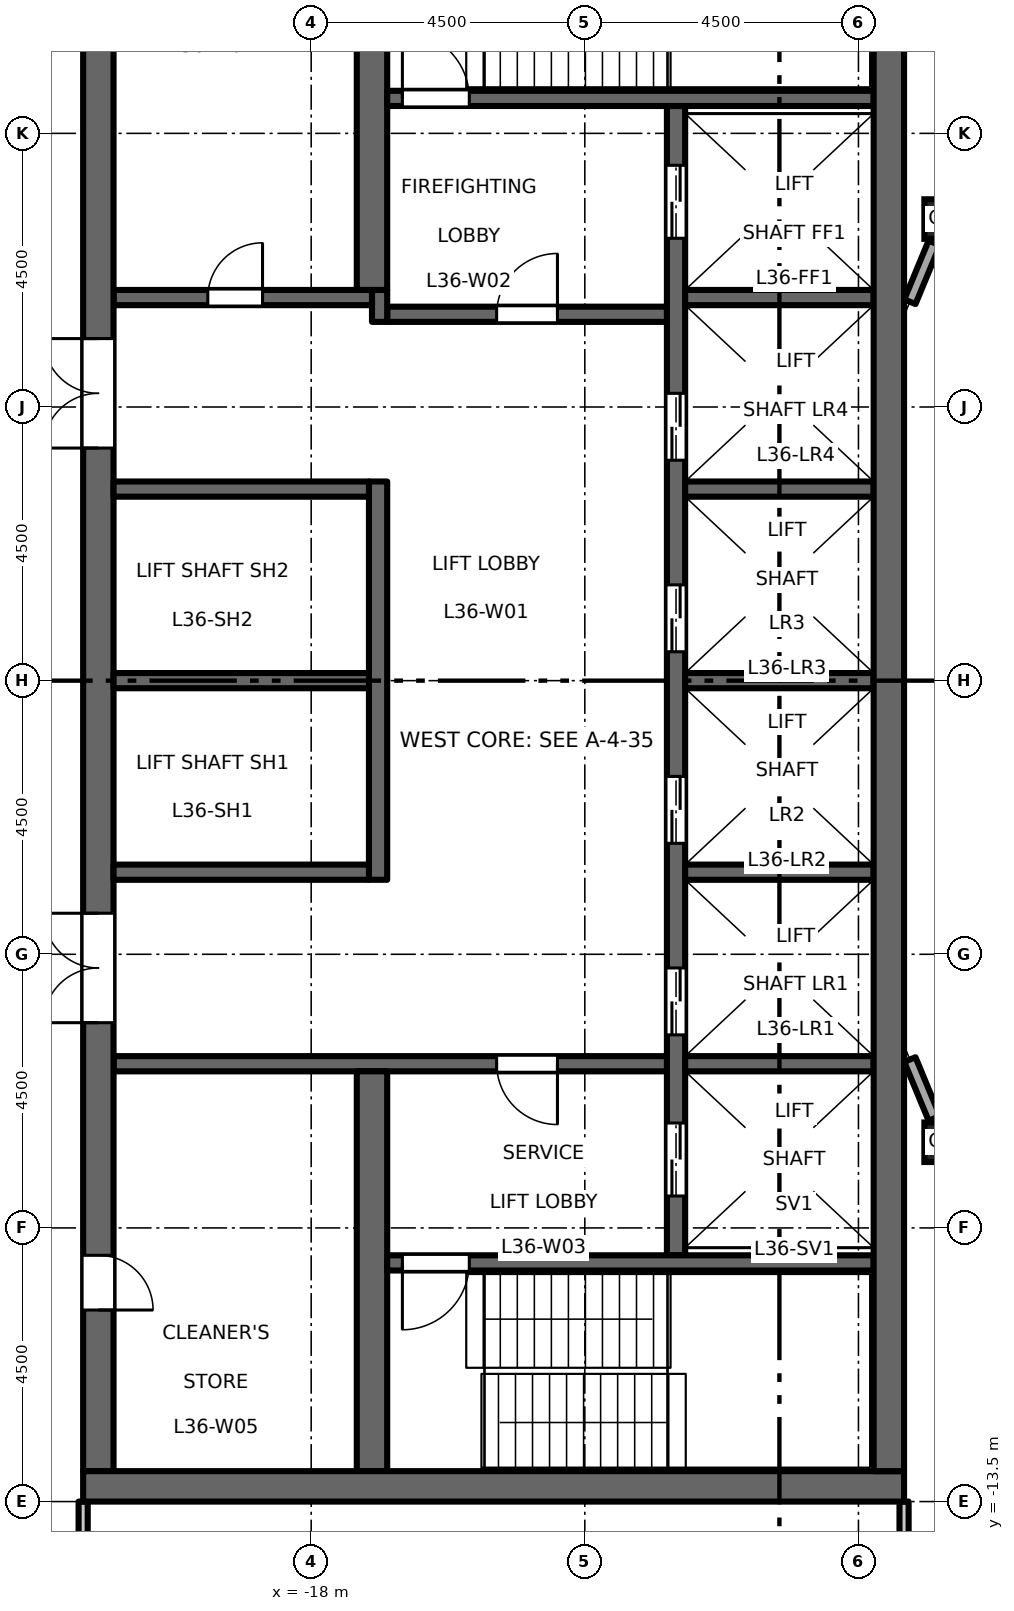
"""IFC4 building model, lengths in metres.
Left out: names, types, materials, properties, quantities, classifications, styles, units other than length and angle.
Written with IfcOpenShell. Run it as: python <this file> out.ifc"""

import sys

from ifc_helpers import new_model, si_unit, direction, frame, frame_2d, origin, origin_2d, place, context, subcontext, project, spatial, rectangle, hollow_rectangle, extrude, element, fill, save


model = new_model("IFC4")
c1 = context("Model", 3, precision=1e-05, world=origin(), true_north=direction((0.0, 1.0)))
c2 = subcontext(c1, "Body", "Model", "MODEL_VIEW")
j1 = project(units=[si_unit("LENGTHUNIT", "METRE"), si_unit("PLANEANGLEUNIT", "RADIAN")], contexts=[c1])
p1 = place(None, origin())
s1 = spatial("IfcSite", under=j1, at=p1, CompositionType="ELEMENT")
p2 = place(p1, origin())
s2 = spatial("IfcBuilding", under=s1, at=p2, CompositionType="ELEMENT")
p3 = place(p2, frame((0.0, 0.0, 167.7)))
s3 = spatial("IfcBuildingStorey", under=s2, at=p3, CompositionType="ELEMENT", Elevation=167.7)
for number, where, z_axis, x_axis in (
    (1, (-7.591, -7.591, 0.0), (0.0, 0.0, 1.0), (1.0, 0.0, 0.0)),
    (2, (-7.591, 7.591, 0.0), (0.0, 0.0, 1.0), (1.0, 0.0, 0.0)),
):
    element("IfcColumn", number, at=place(p3, frame(where, z_axis=z_axis, x_axis=x_axis)), inside=s3, PredefinedType="COLUMN", context=c2, shape_type="SweptSolid", body=[
        extrude(hollow_rectangle(XDim=0.65, YDim=0.65, WallThickness=0.036, at=origin_2d()), origin(), (0.0, 0.0, 1.0), 4.5),
    ])
p4 = place(p3, frame((-12.0, -9.45, 0.0), z_axis=(0.0, 0.0, 1.0), x_axis=(0.0, 1.0, 0.0)))
e3 = element("IfcWall", 3, at=p4, inside=s3, PredefinedType="SHEAR", context=c2, shape_type="SweptSolid", body=[
    extrude(rectangle(XDim=18.9, YDim=0.3, at=frame_2d((9.45, 0.0))), origin(), (0.0, 0.0, 1.0), 4.35),
])
p5 = place(p4, frame((3.625, 0.0, 0.0)))
e4 = element("IfcOpeningElement", 4, at=p5, cuts=e3, PredefinedType="OPENING", context=c2, shape_type="SweptSolid", body=[
    extrude(rectangle(XDim=1.1, YDim=2.1, at=frame_2d((0.55, 1.05))), frame((0.0, 0.16, 0.0), z_axis=(0.0, -1.0, 0.0), x_axis=(1.0, 0.0, 0.0)), (0.0, 0.0, 1.0), 0.32),
])
p6 = place(p4, frame((6.775, 0.0, 0.0)))
e5 = element("IfcOpeningElement", 5, at=p6, cuts=e3, PredefinedType="OPENING", context=c2, shape_type="SweptSolid", body=[
    extrude(rectangle(XDim=1.1, YDim=2.1, at=frame_2d((0.55, 1.05))), frame((0.0, 0.16, 0.0), z_axis=(0.0, -1.0, 0.0), x_axis=(1.0, 0.0, 0.0)), (0.0, 0.0, 1.0), 0.32),
])
p7 = place(p4, frame((9.925, 0.0, 0.0)))
e6 = element("IfcOpeningElement", 6, at=p7, cuts=e3, PredefinedType="OPENING", context=c2, shape_type="SweptSolid", body=[
    extrude(rectangle(XDim=1.1, YDim=2.1, at=frame_2d((0.55, 1.05))), frame((0.0, 0.16, 0.0), z_axis=(0.0, -1.0, 0.0), x_axis=(1.0, 0.0, 0.0)), (0.0, 0.0, 1.0), 0.32),
])
p8 = place(p4, frame((13.075, 0.0, 0.0)))
e7 = element("IfcOpeningElement", 7, at=p8, cuts=e3, PredefinedType="OPENING", context=c2, shape_type="SweptSolid", body=[
    extrude(rectangle(XDim=1.1, YDim=2.1, at=frame_2d((0.55, 1.05))), frame((0.0, 0.16, 0.0), z_axis=(0.0, -1.0, 0.0), x_axis=(1.0, 0.0, 0.0)), (0.0, 0.0, 1.0), 0.32),
])
p9 = place(p4, frame((16.725, 0.0, 0.0)))
e8 = element("IfcOpeningElement", 8, at=p9, cuts=e3, PredefinedType="OPENING", context=c2, shape_type="SweptSolid", body=[
    extrude(rectangle(XDim=1.2, YDim=2.1, at=frame_2d((0.6, 1.05))), frame((0.0, 0.16, 0.0), z_axis=(0.0, -1.0, 0.0), x_axis=(1.0, 0.0, 0.0)), (0.0, 0.0, 1.0), 0.32),
])
p10 = place(p4, frame((0.975, 0.0, 0.0)))
e9 = element("IfcOpeningElement", 9, at=p10, cuts=e3, PredefinedType="OPENING", context=c2, shape_type="SweptSolid", body=[
    extrude(rectangle(XDim=1.2, YDim=2.1, at=frame_2d((0.6, 1.05))), frame((0.0, 0.16, 0.0), z_axis=(0.0, -1.0, 0.0), x_axis=(1.0, 0.0, 0.0)), (0.0, 0.0, 1.0), 0.32),
])
p11 = place(p3, frame((-12.15, 6.025, 0.0), z_axis=(0.0, 0.0, 1.0), x_axis=(-1.0, 0.0, 0.0)))
e10 = element("IfcWall", 10, at=p11, inside=s3, PredefinedType="SHEAR", context=c2, shape_type="SweptSolid", body=[
    extrude(rectangle(XDim=4.6, YDim=0.25, at=frame_2d((2.3, 0.0))), origin(), (0.0, 0.0, 1.0), 4.35),
])
p12 = place(p11, frame((1.8, 0.0, 0.0)))
e11 = element("IfcOpeningElement", 11, at=p12, cuts=e10, PredefinedType="OPENING", context=c2, shape_type="SweptSolid", body=[
    extrude(rectangle(XDim=1.0, YDim=2.1, at=frame_2d((0.5, 1.05))), frame((0.0, 0.135, 0.0), z_axis=(0.0, -1.0, 0.0), x_axis=(1.0, 0.0, 0.0)), (0.0, 0.0, 1.0), 0.27),
])
p13 = place(p3, frame((-16.875, 5.9, 0.0), z_axis=(0.0, 0.0, 1.0), x_axis=(0.0, 1.0, 0.0)))
e12 = element("IfcWall", 12, at=p13, inside=s3, PredefinedType="SHEAR", context=c2, shape_type="SweptSolid", body=[
    extrude(rectangle(XDim=0.525, YDim=0.25, at=frame_2d((0.263, 0.0))), origin(), (0.0, 0.0, 1.0), 4.35),
])
p14 = place(p3, frame((-17.0, 6.3, 0.0), z_axis=(0.0, 0.0, 1.0), x_axis=(-1.0, 0.0, 0.0)))
e13 = element("IfcWall", 13, at=p14, inside=s3, PredefinedType="SHEAR", context=c2, shape_type="SweptSolid", body=[
    extrude(rectangle(XDim=4.25, YDim=0.25, at=frame_2d((2.125, 0.0))), origin(), (0.0, 0.0, 1.0), 4.35),
])
p15 = place(p14, frame((1.8, 0.0, 0.0)))
e14 = element("IfcOpeningElement", 14, at=p15, cuts=e13, PredefinedType="OPENING", context=c2, shape_type="SweptSolid", body=[
    extrude(rectangle(XDim=0.9, YDim=2.1, at=frame_2d((0.45, 1.05))), frame((0.0, 0.135, 0.0), z_axis=(0.0, -1.0, 0.0), x_axis=(1.0, 0.0, 0.0)), (0.0, 0.0, 1.0), 0.27),
])
p16 = place(p3, frame((-12.15, -6.3, 0.0), z_axis=(0.0, 0.0, 1.0), x_axis=(-1.0, 0.0, 0.0)))
e15 = element("IfcWall", 15, at=p16, inside=s3, PredefinedType="SHEAR", context=c2, shape_type="SweptSolid", body=[
    extrude(rectangle(XDim=9.1, YDim=0.25, at=frame_2d((4.55, 0.0))), origin(), (0.0, 0.0, 1.0), 4.35),
])
p17 = place(p16, frame((1.8, 0.0, 0.0)))
e16 = element("IfcOpeningElement", 16, at=p17, cuts=e15, PredefinedType="OPENING", context=c2, shape_type="SweptSolid", body=[
    extrude(rectangle(XDim=1.0, YDim=2.1, at=frame_2d((0.5, 1.05))), frame((0.0, 0.135, 0.0), z_axis=(0.0, -1.0, 0.0), x_axis=(1.0, 0.0, 0.0)), (0.0, 0.0, 1.0), 0.27),
])
p18 = place(p3, frame((-21.5, -13.0, 0.0), z_axis=(0.0, 0.0, 1.0), x_axis=(0.0, 1.0, 0.0)))
e17 = element("IfcWall", 17, at=p18, inside=s3, PredefinedType="SHEAR", context=c2, shape_type="SweptSolid", body=[
    extrude(rectangle(XDim=26.0, YDim=0.5, at=frame_2d((13.0, 0.0))), origin(), (0.0, 0.0, 1.0), 4.35),
])
p19 = place(p18, frame((16.825, 0.0, 0.0)))
e18 = element("IfcOpeningElement", 18, at=p19, cuts=e17, PredefinedType="OPENING", context=c2, shape_type="SweptSolid", body=[
    extrude(rectangle(XDim=1.8, YDim=2.1, at=frame_2d((0.9, 1.05))), frame((0.0, 0.26, 0.0), z_axis=(0.0, -1.0, 0.0), x_axis=(1.0, 0.0, 0.0)), (0.0, 0.0, 1.0), 0.52),
])
p20 = place(p18, frame((7.375, 0.0, 0.0)))
e19 = element("IfcOpeningElement", 19, at=p20, cuts=e17, PredefinedType="OPENING", context=c2, shape_type="SweptSolid", body=[
    extrude(rectangle(XDim=1.8, YDim=2.1, at=frame_2d((0.9, 1.05))), frame((0.0, 0.26, 0.0), z_axis=(0.0, -1.0, 0.0), x_axis=(1.0, 0.0, 0.0)), (0.0, 0.0, 1.0), 0.52),
])
p21 = place(p18, frame((2.65, 0.0, 0.0)))
e20 = element("IfcOpeningElement", 20, at=p21, cuts=e17, PredefinedType="OPENING", context=c2, shape_type="SweptSolid", body=[
    extrude(rectangle(XDim=0.9, YDim=2.1, at=frame_2d((0.45, 1.05))), frame((0.0, 0.26, 0.0), z_axis=(0.0, -1.0, 0.0), x_axis=(1.0, 0.0, 0.0)), (0.0, 0.0, 1.0), 0.52),
])
p22 = place(p3, frame((-16.9, -3.275, 0.0), z_axis=(0.0, 0.0, 1.0), x_axis=(0.0, 1.0, 0.0)))
e21 = element("IfcWall", 21, at=p22, inside=s3, PredefinedType="SHEAR", context=c2, shape_type="SweptSolid", body=[
    extrude(rectangle(XDim=6.55, YDim=0.3, at=frame_2d((3.275, 0.0))), origin(), (0.0, 0.0, 1.0), 4.35),
])
for number, where, z_axis, x_axis in (
    (22, (-17.05, 0.0, 0.0), (0.0, 0.0, 1.0), (-1.0, 0.0, 0.0)),
    (23, (-17.05, 3.15, 0.0), (0.0, 0.0, 1.0), (-1.0, 0.0, 0.0)),
    (24, (-17.05, -3.15, 0.0), (0.0, 0.0, 1.0), (-1.0, 0.0, 0.0)),
):
    element("IfcWall", number, at=place(p3, frame(where, z_axis=z_axis, x_axis=x_axis)), inside=s3, PredefinedType="SHEAR", context=c2, shape_type="SweptSolid", body=[
        extrude(rectangle(XDim=4.2, YDim=0.25, at=frame_2d((2.1, 0.0))), origin(), (0.0, 0.0, 1.0), 4.35),
    ])
for number, where, z_axis, x_axis in (
    (25, (-17.0, 6.425, 0.0), (0.0, 0.0, 1.0), (0.0, 1.0, 0.0)),
    (26, (-17.0, -13.0, 0.0), (0.0, 0.0, 1.0), (0.0, 1.0, 0.0)),
):
    element("IfcWall", number, at=place(p3, frame(where, z_axis=z_axis, x_axis=x_axis)), inside=s3, PredefinedType="SHEAR", context=c2, shape_type="SweptSolid", body=[
        extrude(rectangle(XDim=6.575, YDim=0.5, at=frame_2d((3.288, 0.0))), origin(), (0.0, 0.0, 1.0), 4.35),
    ])
for number, where, z_axis, x_axis in (
    (27, (-8.75, 0.0, 0.0), (0.0, 0.0, 1.0), (-1.0, 0.0, 0.0)),
    (28, (-8.75, 3.15, 0.0), (0.0, 0.0, 1.0), (-1.0, 0.0, 0.0)),
    (29, (-8.75, 6.3, 0.0), (0.0, 0.0, 1.0), (-1.0, 0.0, 0.0)),
    (30, (-8.75, -3.15, 0.0), (0.0, 0.0, 1.0), (-1.0, 0.0, 0.0)),
    (31, (-8.75, -6.3, 0.0), (0.0, 0.0, 1.0), (-1.0, 0.0, 0.0)),
):
    element("IfcWall", number, at=place(p3, frame(where, z_axis=z_axis, x_axis=x_axis)), inside=s3, PredefinedType="SHEAR", context=c2, shape_type="SweptSolid", body=[
        extrude(rectangle(XDim=3.1, YDim=0.25, at=frame_2d((1.55, 0.0))), origin(), (0.0, 0.0, 1.0), 4.35),
    ])
p23 = place(p3, frame((-8.75, 9.575, 0.0), z_axis=(0.0, 0.0, 1.0), x_axis=(-1.0, 0.0, 0.0)))
e32 = element("IfcWall", 32, at=p23, inside=s3, PredefinedType="SHEAR", context=c2, shape_type="SweptSolid", body=[
    extrude(rectangle(XDim=8.0, YDim=0.25, at=frame_2d((4.0, 0.0))), origin(), (0.0, 0.0, 1.0), 4.35),
])
p24 = place(p23, frame((6.65, 0.0, 0.0)))
e33 = element("IfcOpeningElement", 33, at=p24, cuts=e32, PredefinedType="OPENING", context=c2, shape_type="SweptSolid", body=[
    extrude(rectangle(XDim=1.1, YDim=2.1, at=frame_2d((0.55, 1.05))), frame((0.0, 0.135, 0.0), z_axis=(0.0, -1.0, 0.0), x_axis=(1.0, 0.0, 0.0)), (0.0, 0.0, 1.0), 0.27),
])
p25 = place(p3, frame((-8.75, -9.575, 0.0), z_axis=(0.0, 0.0, 1.0), x_axis=(-1.0, 0.0, 0.0)))
e34 = element("IfcWall", 34, at=p25, inside=s3, PredefinedType="SHEAR", context=c2, shape_type="SweptSolid", body=[
    extrude(rectangle(XDim=8.0, YDim=0.25, at=frame_2d((4.0, 0.0))), origin(), (0.0, 0.0, 1.0), 4.35),
])
p26 = place(p25, frame((6.65, 0.0, 0.0)))
e35 = element("IfcOpeningElement", 35, at=p26, cuts=e34, PredefinedType="OPENING", context=c2, shape_type="SweptSolid", body=[
    extrude(rectangle(XDim=1.1, YDim=2.1, at=frame_2d((0.55, 1.05))), frame((0.0, 0.135, 0.0), z_axis=(0.0, -1.0, 0.0), x_axis=(1.0, 0.0, 0.0)), (0.0, 0.0, 1.0), 0.27),
])
p27 = place(p3, frame((-8.25, -13.25, 0.0), z_axis=(0.0, 0.0, 1.0), x_axis=(-1.0, 0.0, 0.0)))
e36 = element("IfcWall", 36, at=p27, inside=s3, PredefinedType="SHEAR", context=c2, shape_type="SweptSolid", body=[
    extrude(rectangle(XDim=13.5, YDim=0.5, at=frame_2d((6.75, 0.0))), origin(), (0.0, 0.0, 1.0), 4.35),
])
p28 = place(p3, frame((-8.5, -13.0, 0.0), z_axis=(0.0, 0.0, 1.0), x_axis=(0.0, 1.0, 0.0)))
e37 = element("IfcWall", 37, at=p28, inside=s3, PredefinedType="SHEAR", context=c2, shape_type="SweptSolid", body=[
    extrude(rectangle(XDim=26.0, YDim=0.5, at=frame_2d((13.0, 0.0))), origin(), (0.0, 0.0, 1.0), 4.35),
])
for number, where, z_axis, x_axis in (
    (38, (-7.753, 7.199, 0.0), (0.0, 0.0, 1.0), (-0.383, -0.924, 0.0)),
    (39, (-8.154, -6.231, 0.0), (0.0, 0.0, 1.0), (0.383, -0.924, 0.0)),
):
    element("IfcWall", number, at=place(p3, frame(where, z_axis=z_axis, x_axis=x_axis)), inside=s3, PredefinedType="STANDARD", context=c2, shape_type="SweptSolid", body=[
        extrude(rectangle(XDim=1.048, YDim=0.2, at=frame_2d((0.524, 0.0))), origin(), (0.0, 0.0, 1.0), 3.826),
    ])
for number, where, z_axis, x_axis in (
    (40, (-21.75, -17.925, 0.0), (0.0, 0.0, 1.0), (0.0, 1.0, 0.0)),
    (41, (-8.25, -17.925, 0.0), (0.0, 0.0, 1.0), (0.0, 1.0, 0.0)),
):
    element("IfcWall", number, at=place(p3, frame(where, z_axis=z_axis, x_axis=x_axis)), inside=s3, PredefinedType="PARTITIONING", context=c2, shape_type="SweptSolid", body=[
        extrude(rectangle(XDim=4.425, YDim=0.15, at=frame_2d((2.212, 0.0))), origin(), (0.0, 0.0, 1.0), 4.35),
    ])
p29 = place(p12, origin())
e42 = element("IfcDoor", 42, at=p29, inside=s3, OperationType="SINGLE_SWING_LEFT", PredefinedType="DOOR", context=c2, shape_type="SweptSolid", body=[
    extrude(rectangle(XDim=1.0, YDim=2.1, at=frame_2d((0.5, 1.05))), frame((0.0, 0.025, 0.0), z_axis=(0.0, -1.0, 0.0), x_axis=(1.0, 0.0, 0.0)), (0.0, 0.0, 1.0), 0.05),
])
fill(e11, e42)
p30 = place(p17, origin())
e43 = element("IfcDoor", 43, at=p30, inside=s3, OperationType="SINGLE_SWING_RIGHT", PredefinedType="DOOR", context=c2, shape_type="SweptSolid", body=[
    extrude(rectangle(XDim=1.0, YDim=2.1, at=frame_2d((0.5, 1.05))), frame((0.0, 0.025, 0.0), z_axis=(0.0, -1.0, 0.0), x_axis=(1.0, 0.0, 0.0)), (0.0, 0.0, 1.0), 0.05),
])
fill(e16, e43)
p31 = place(p24, origin())
e44 = element("IfcDoor", 44, at=p31, inside=s3, OperationType="SINGLE_SWING_RIGHT", PredefinedType="DOOR", context=c2, shape_type="SweptSolid", body=[
    extrude(rectangle(XDim=1.1, YDim=2.1, at=frame_2d((0.55, 1.05))), frame((0.0, 0.025, 0.0), z_axis=(0.0, -1.0, 0.0), x_axis=(1.0, 0.0, 0.0)), (0.0, 0.0, 1.0), 0.05),
])
fill(e33, e44)
p32 = place(p26, origin())
e45 = element("IfcDoor", 45, at=p32, inside=s3, OperationType="SINGLE_SWING_LEFT", PredefinedType="DOOR", context=c2, shape_type="SweptSolid", body=[
    extrude(rectangle(XDim=1.1, YDim=2.1, at=frame_2d((0.55, 1.05))), frame((0.0, 0.025, 0.0), z_axis=(0.0, -1.0, 0.0), x_axis=(1.0, 0.0, 0.0)), (0.0, 0.0, 1.0), 0.05),
])
fill(e35, e45)
p33 = place(p19, origin())
e46 = element("IfcDoor", 46, at=p33, inside=s3, OperationType="DOUBLE_DOOR_DOUBLE_SWING", PredefinedType="DOOR", context=c2, shape_type="SweptSolid", body=[
    extrude(rectangle(XDim=1.8, YDim=2.1, at=frame_2d((0.9, 1.05))), frame((0.0, 0.025, 0.0), z_axis=(0.0, -1.0, 0.0), x_axis=(1.0, 0.0, 0.0)), (0.0, 0.0, 1.0), 0.05),
])
fill(e18, e46)
p34 = place(p20, origin())
e47 = element("IfcDoor", 47, at=p34, inside=s3, OperationType="DOUBLE_DOOR_DOUBLE_SWING", PredefinedType="DOOR", context=c2, shape_type="SweptSolid", body=[
    extrude(rectangle(XDim=1.8, YDim=2.1, at=frame_2d((0.9, 1.05))), frame((0.0, 0.025, 0.0), z_axis=(0.0, -1.0, 0.0), x_axis=(1.0, 0.0, 0.0)), (0.0, 0.0, 1.0), 0.05),
])
fill(e19, e47)
p35 = place(p5, origin())
e48 = element("IfcDoor", 48, at=p35, inside=s3, OperationType="DOUBLE_DOOR_SLIDING", PredefinedType="DOOR", context=c2, shape_type="SweptSolid", body=[
    extrude(rectangle(XDim=1.1, YDim=2.1, at=frame_2d((0.55, 1.05))), frame((0.0, 0.025, 0.0), z_axis=(0.0, -1.0, 0.0), x_axis=(1.0, 0.0, 0.0)), (0.0, 0.0, 1.0), 0.05),
])
fill(e4, e48)
p36 = place(p6, origin())
e49 = element("IfcDoor", 49, at=p36, inside=s3, OperationType="DOUBLE_DOOR_SLIDING", PredefinedType="DOOR", context=c2, shape_type="SweptSolid", body=[
    extrude(rectangle(XDim=1.1, YDim=2.1, at=frame_2d((0.55, 1.05))), frame((0.0, 0.025, 0.0), z_axis=(0.0, -1.0, 0.0), x_axis=(1.0, 0.0, 0.0)), (0.0, 0.0, 1.0), 0.05),
])
fill(e5, e49)
p37 = place(p7, origin())
e50 = element("IfcDoor", 50, at=p37, inside=s3, OperationType="DOUBLE_DOOR_SLIDING", PredefinedType="DOOR", context=c2, shape_type="SweptSolid", body=[
    extrude(rectangle(XDim=1.1, YDim=2.1, at=frame_2d((0.55, 1.05))), frame((0.0, 0.025, 0.0), z_axis=(0.0, -1.0, 0.0), x_axis=(1.0, 0.0, 0.0)), (0.0, 0.0, 1.0), 0.05),
])
fill(e6, e50)
p38 = place(p8, origin())
e51 = element("IfcDoor", 51, at=p38, inside=s3, OperationType="DOUBLE_DOOR_SLIDING", PredefinedType="DOOR", context=c2, shape_type="SweptSolid", body=[
    extrude(rectangle(XDim=1.1, YDim=2.1, at=frame_2d((0.55, 1.05))), frame((0.0, 0.025, 0.0), z_axis=(0.0, -1.0, 0.0), x_axis=(1.0, 0.0, 0.0)), (0.0, 0.0, 1.0), 0.05),
])
fill(e7, e51)
p39 = place(p9, origin())
e52 = element("IfcDoor", 52, at=p39, inside=s3, OperationType="DOUBLE_DOOR_SLIDING", PredefinedType="DOOR", context=c2, shape_type="SweptSolid", body=[
    extrude(rectangle(XDim=1.2, YDim=2.1, at=frame_2d((0.6, 1.05))), frame((0.0, 0.025, 0.0), z_axis=(0.0, -1.0, 0.0), x_axis=(1.0, 0.0, 0.0)), (0.0, 0.0, 1.0), 0.05),
])
fill(e8, e52)
p40 = place(p10, origin())
e53 = element("IfcDoor", 53, at=p40, inside=s3, OperationType="DOUBLE_DOOR_SLIDING", PredefinedType="DOOR", context=c2, shape_type="SweptSolid", body=[
    extrude(rectangle(XDim=1.2, YDim=2.1, at=frame_2d((0.6, 1.05))), frame((0.0, 0.025, 0.0), z_axis=(0.0, -1.0, 0.0), x_axis=(1.0, 0.0, 0.0)), (0.0, 0.0, 1.0), 0.05),
])
fill(e9, e53)
p41 = place(p15, origin())
e54 = element("IfcDoor", 54, at=p41, inside=s3, OperationType="SINGLE_SWING_LEFT", PredefinedType="DOOR", context=c2, shape_type="SweptSolid", body=[
    extrude(rectangle(XDim=0.9, YDim=2.1, at=frame_2d((0.45, 1.05))), frame((0.0, 0.025, 0.0), z_axis=(0.0, -1.0, 0.0), x_axis=(1.0, 0.0, 0.0)), (0.0, 0.0, 1.0), 0.05),
])
fill(e14, e54)
p42 = place(p21, origin())
e55 = element("IfcDoor", 55, at=p42, inside=s3, OperationType="SINGLE_SWING_LEFT", PredefinedType="DOOR", context=c2, shape_type="SweptSolid", body=[
    extrude(rectangle(XDim=0.9, YDim=2.1, at=frame_2d((0.45, 1.05))), frame((0.0, 0.025, 0.0), z_axis=(0.0, -1.0, 0.0), x_axis=(1.0, 0.0, 0.0)), (0.0, 0.0, 1.0), 0.05),
])
fill(e20, e55)
save(model, sys.argv[1])
